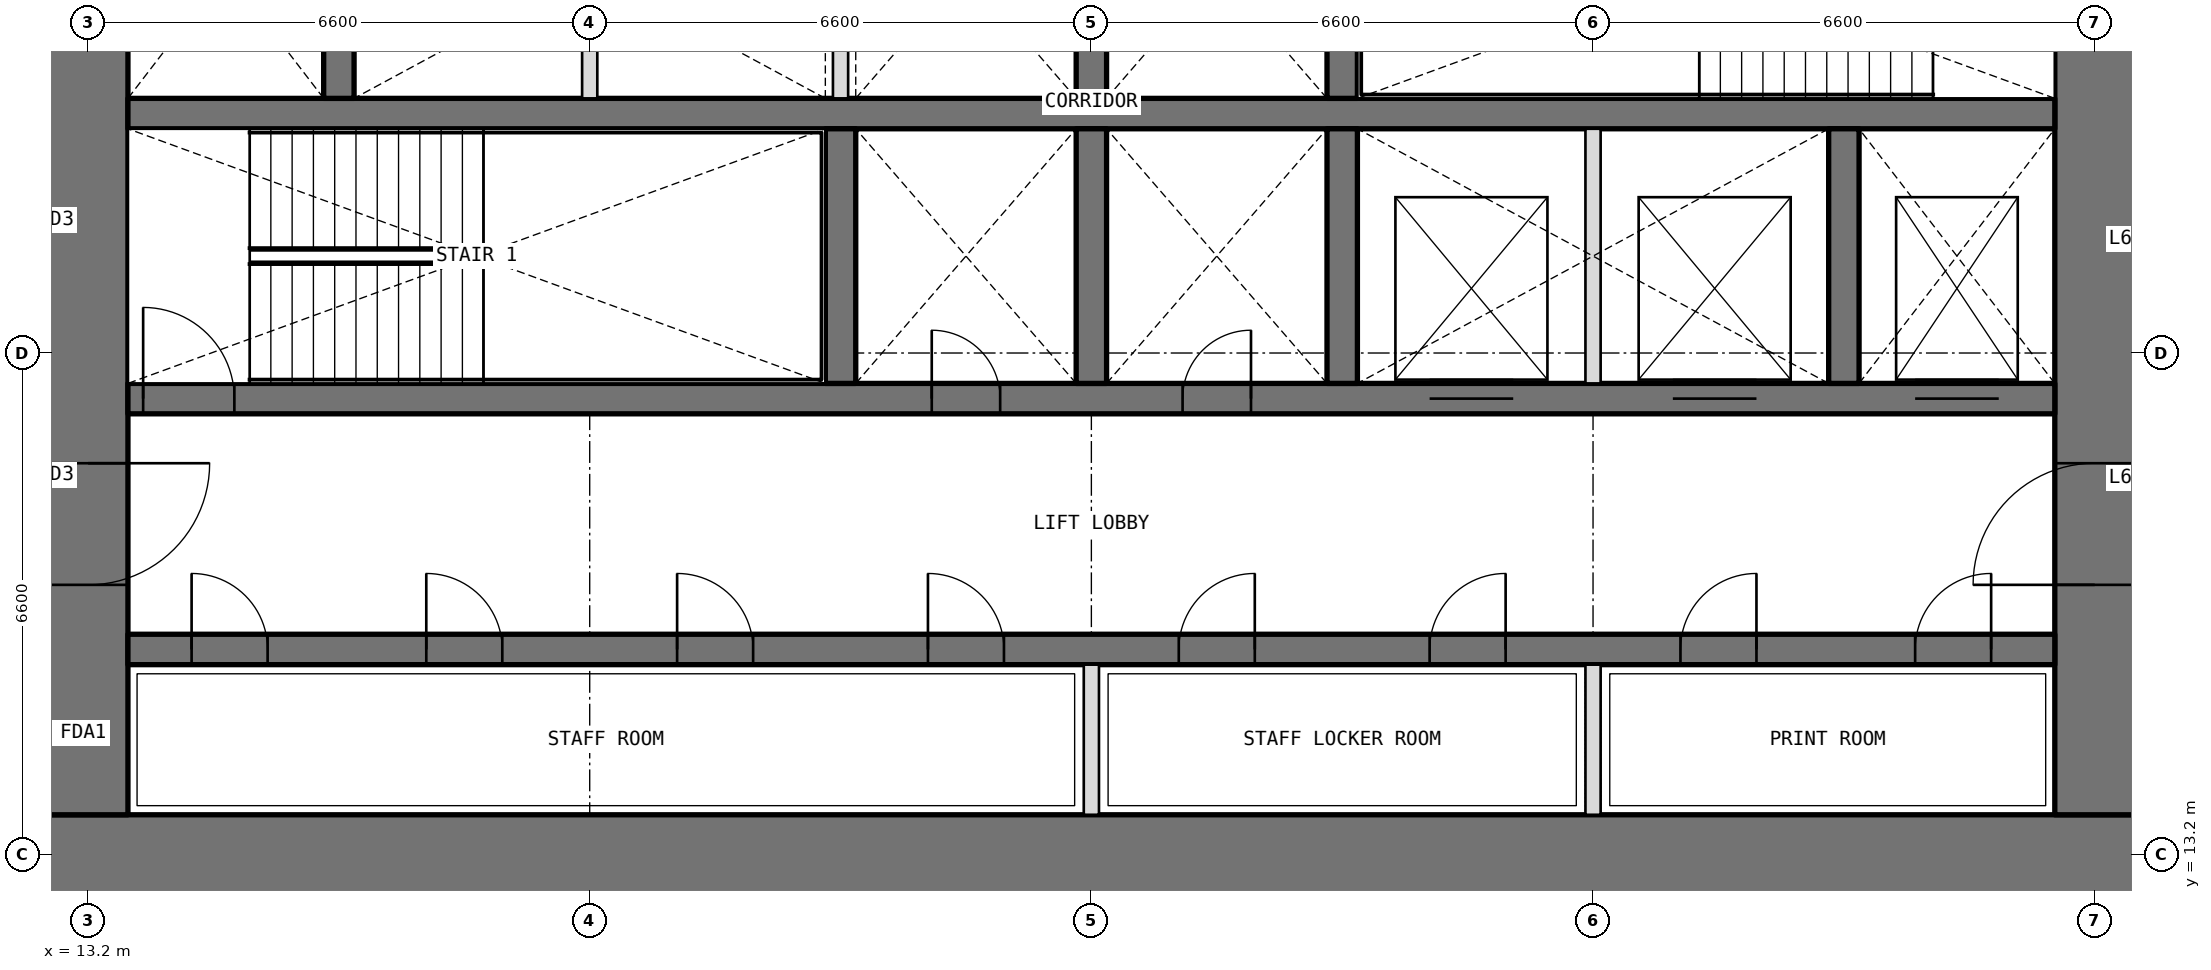
"""IFC4 building model, lengths in metres.
Left out: names, types, materials, properties, quantities, classifications, styles, units other than length and angle.
Written with IfcOpenShell. Run it as: python <this file> out.ifc"""

import sys

from ifc_helpers import new_model, si_unit, direction, frame, frame_2d, origin, place, context, subcontext, project, spatial, rectangle, extrude, element, fill, save


model = new_model("IFC4")
c1 = context("Model", 3, precision=1e-05, world=origin(), true_north=direction((0.0, 1.0)))
c2 = subcontext(c1, "Body", "Model", "MODEL_VIEW")
j1 = project(units=[si_unit("LENGTHUNIT", "METRE"), si_unit("PLANEANGLEUNIT", "RADIAN")], contexts=[c1])
p1 = place(None, origin())
s1 = spatial("IfcSite", under=j1, at=p1, CompositionType="ELEMENT")
p2 = place(p1, origin())
s2 = spatial("IfcBuilding", under=s1, at=p2, CompositionType="ELEMENT")
p3 = place(p2, frame((0.0, 0.0, 279.6)))
s3 = spatial("IfcBuildingStorey", under=s2, at=p3, CompositionType="ELEMENT", Elevation=279.6)
p4 = place(p3, frame((12.675, 13.2, 0.0), z_axis=(0.0, 0.0, 1.0), x_axis=(1.0, 0.0, 0.0)))
e1 = element("IfcWall", 1, at=p4, inside=s3, PredefinedType="SHEAR", context=c2, shape_type="SweptSolid", body=[
    extrude(rectangle(XDim=27.45, YDim=1.05, at=frame_2d((13.725, 0.0))), origin(), (0.0, 0.0, 1.0), 4.2),
])
p5 = place(p3, frame((39.6, 13.725, 0.0), z_axis=(0.0, 0.0, 1.0), x_axis=(0.0, 1.0, 0.0)))
e2 = element("IfcWall", 2, at=p5, inside=s3, PredefinedType="SHEAR", context=c2, shape_type="SweptSolid", body=[
    extrude(rectangle(XDim=18.75, YDim=1.05, at=frame_2d((9.375, 0.0))), origin(), (0.0, 0.0, 1.0), 4.2),
])
p6 = place(p5, frame((3.025, 0.0, 0.0)))
e3 = element("IfcOpeningElement", 3, at=p6, cuts=e2, PredefinedType="OPENING", context=c2, shape_type="SweptSolid", body=[
    extrude(rectangle(XDim=1.6, YDim=2.1, at=frame_2d((0.8, 1.05))), frame((0.0, 0.535, 0.0), z_axis=(0.0, -1.0, 0.0), x_axis=(1.0, 0.0, 0.0)), (0.0, 0.0, 1.0), 1.07),
])
p7 = place(p5, frame((13.825, 0.0, 0.0)))
e4 = element("IfcOpeningElement", 4, at=p7, cuts=e2, PredefinedType="OPENING", context=c2, shape_type="SweptSolid", body=[
    extrude(rectangle(XDim=1.6, YDim=2.1, at=frame_2d((0.8, 1.05))), frame((0.0, 0.535, 0.0), z_axis=(0.0, -1.0, 0.0), x_axis=(1.0, 0.0, 0.0)), (0.0, 0.0, 1.0), 1.07),
])
p8 = place(p3, frame((13.2, 32.475, 0.0), z_axis=(0.0, 0.0, 1.0), x_axis=(0.0, -1.0, 0.0)))
e5 = element("IfcWall", 5, at=p8, inside=s3, PredefinedType="SHEAR", context=c2, shape_type="SweptSolid", body=[
    extrude(rectangle(XDim=18.75, YDim=1.05, at=frame_2d((9.375, 0.0))), origin(), (0.0, 0.0, 1.0), 4.2),
])
p9 = place(p8, frame((14.125, 0.0, 0.0)))
e6 = element("IfcOpeningElement", 6, at=p9, cuts=e5, PredefinedType="OPENING", context=c2, shape_type="SweptSolid", body=[
    extrude(rectangle(XDim=1.6, YDim=2.1, at=frame_2d((0.8, 1.05))), frame((0.0, 0.535, 0.0), z_axis=(0.0, -1.0, 0.0), x_axis=(1.0, 0.0, 0.0)), (0.0, 0.0, 1.0), 1.07),
])
p10 = place(p8, frame((3.325, 0.0, 0.0)))
e7 = element("IfcOpeningElement", 7, at=p10, cuts=e5, PredefinedType="OPENING", context=c2, shape_type="SweptSolid", body=[
    extrude(rectangle(XDim=1.6, YDim=2.1, at=frame_2d((0.8, 1.05))), frame((0.0, 0.535, 0.0), z_axis=(0.0, -1.0, 0.0), x_axis=(1.0, 0.0, 0.0)), (0.0, 0.0, 1.0), 1.07),
])
p11 = place(p3, frame((13.725, 15.9, 0.0), z_axis=(0.0, 0.0, 1.0), x_axis=(1.0, 0.0, 0.0)))
e8 = element("IfcWall", 8, at=p11, inside=s3, PredefinedType="SHEAR", context=c2, shape_type="SweptSolid", body=[
    extrude(rectangle(XDim=25.35, YDim=0.4, at=frame_2d((12.675, 0.0))), origin(), (0.0, 0.0, 1.0), 4.2),
])
p12 = place(p11, frame((0.837, 0.0, 0.0)))
e9 = element("IfcOpeningElement", 9, at=p12, cuts=e8, PredefinedType="OPENING", context=c2, shape_type="SweptSolid", body=[
    extrude(rectangle(XDim=1.0, YDim=2.1, at=frame_2d((0.5, 1.05))), frame((0.0, 0.21, 0.0), z_axis=(0.0, -1.0, 0.0), x_axis=(1.0, 0.0, 0.0)), (0.0, 0.0, 1.0), 0.42),
])
p13 = place(p11, frame((3.925, 0.0, 0.0)))
e10 = element("IfcOpeningElement", 10, at=p13, cuts=e8, PredefinedType="OPENING", context=c2, shape_type="SweptSolid", body=[
    extrude(rectangle(XDim=1.0, YDim=2.1, at=frame_2d((0.5, 1.05))), frame((0.0, 0.21, 0.0), z_axis=(0.0, -1.0, 0.0), x_axis=(1.0, 0.0, 0.0)), (0.0, 0.0, 1.0), 0.42),
])
p14 = place(p11, frame((7.225, 0.0, 0.0)))
e11 = element("IfcOpeningElement", 11, at=p14, cuts=e8, PredefinedType="OPENING", context=c2, shape_type="SweptSolid", body=[
    extrude(rectangle(XDim=1.0, YDim=2.1, at=frame_2d((0.5, 1.05))), frame((0.0, 0.21, 0.0), z_axis=(0.0, -1.0, 0.0), x_axis=(1.0, 0.0, 0.0)), (0.0, 0.0, 1.0), 0.42),
])
p15 = place(p11, frame((10.525, 0.0, 0.0)))
e12 = element("IfcOpeningElement", 12, at=p15, cuts=e8, PredefinedType="OPENING", context=c2, shape_type="SweptSolid", body=[
    extrude(rectangle(XDim=1.0, YDim=2.1, at=frame_2d((0.5, 1.05))), frame((0.0, 0.21, 0.0), z_axis=(0.0, -1.0, 0.0), x_axis=(1.0, 0.0, 0.0)), (0.0, 0.0, 1.0), 0.42),
])
p16 = place(p11, frame((13.825, 0.0, 0.0)))
e13 = element("IfcOpeningElement", 13, at=p16, cuts=e8, PredefinedType="OPENING", context=c2, shape_type="SweptSolid", body=[
    extrude(rectangle(XDim=1.0, YDim=2.1, at=frame_2d((0.5, 1.05))), frame((0.0, 0.21, 0.0), z_axis=(0.0, -1.0, 0.0), x_axis=(1.0, 0.0, 0.0)), (0.0, 0.0, 1.0), 0.42),
])
p17 = place(p11, frame((17.125, 0.0, 0.0)))
e14 = element("IfcOpeningElement", 14, at=p17, cuts=e8, PredefinedType="OPENING", context=c2, shape_type="SweptSolid", body=[
    extrude(rectangle(XDim=1.0, YDim=2.1, at=frame_2d((0.5, 1.05))), frame((0.0, 0.21, 0.0), z_axis=(0.0, -1.0, 0.0), x_axis=(1.0, 0.0, 0.0)), (0.0, 0.0, 1.0), 0.42),
])
p18 = place(p11, frame((20.425, 0.0, 0.0)))
e15 = element("IfcOpeningElement", 15, at=p18, cuts=e8, PredefinedType="OPENING", context=c2, shape_type="SweptSolid", body=[
    extrude(rectangle(XDim=1.0, YDim=2.1, at=frame_2d((0.5, 1.05))), frame((0.0, 0.21, 0.0), z_axis=(0.0, -1.0, 0.0), x_axis=(1.0, 0.0, 0.0)), (0.0, 0.0, 1.0), 0.42),
])
p19 = place(p11, frame((23.512, 0.0, 0.0)))
e16 = element("IfcOpeningElement", 16, at=p19, cuts=e8, PredefinedType="OPENING", context=c2, shape_type="SweptSolid", body=[
    extrude(rectangle(XDim=1.0, YDim=2.1, at=frame_2d((0.5, 1.05))), frame((0.0, 0.21, 0.0), z_axis=(0.0, -1.0, 0.0), x_axis=(1.0, 0.0, 0.0)), (0.0, 0.0, 1.0), 0.42),
])
p20 = place(p3, frame((13.725, 19.2, 0.0), z_axis=(0.0, 0.0, 1.0), x_axis=(1.0, 0.0, 0.0)))
e17 = element("IfcWall", 17, at=p20, inside=s3, PredefinedType="SHEAR", context=c2, shape_type="SweptSolid", body=[
    extrude(rectangle(XDim=25.35, YDim=0.4, at=frame_2d((12.675, 0.0))), origin(), (0.0, 0.0, 1.0), 4.2),
])
p21 = place(p20, frame((10.575, 0.0, 0.0)))
e18 = element("IfcOpeningElement", 18, at=p21, cuts=e17, PredefinedType="OPENING", context=c2, shape_type="SweptSolid", body=[
    extrude(rectangle(XDim=0.9, YDim=2.1, at=frame_2d((0.45, 1.05))), frame((0.0, 0.21, 0.0), z_axis=(0.0, -1.0, 0.0), x_axis=(1.0, 0.0, 0.0)), (0.0, 0.0, 1.0), 0.42),
])
p22 = place(p20, frame((13.875, 0.0, 0.0)))
e19 = element("IfcOpeningElement", 19, at=p22, cuts=e17, PredefinedType="OPENING", context=c2, shape_type="SweptSolid", body=[
    extrude(rectangle(XDim=0.9, YDim=2.1, at=frame_2d((0.45, 1.05))), frame((0.0, 0.21, 0.0), z_axis=(0.0, -1.0, 0.0), x_axis=(1.0, 0.0, 0.0)), (0.0, 0.0, 1.0), 0.42),
])
p23 = place(p20, frame((0.2, 0.0, 0.0)))
e20 = element("IfcOpeningElement", 20, at=p23, cuts=e17, PredefinedType="OPENING", context=c2, shape_type="SweptSolid", body=[
    extrude(rectangle(XDim=1.2, YDim=2.1, at=frame_2d((0.6, 1.05))), frame((0.0, 0.21, 0.0), z_axis=(0.0, -1.0, 0.0), x_axis=(1.0, 0.0, 0.0)), (0.0, 0.0, 1.0), 0.42),
])
p24 = place(p20, frame((23.512, 0.0, 0.0)))
e21 = element("IfcOpeningElement", 21, at=p24, cuts=e17, PredefinedType="OPENING", context=c2, shape_type="SweptSolid", body=[
    extrude(rectangle(XDim=1.1, YDim=2.1, at=frame_2d((0.55, 1.05))), frame((0.0, 0.21, 0.0), z_axis=(0.0, -1.0, 0.0), x_axis=(1.0, 0.0, 0.0)), (0.0, 0.0, 1.0), 0.42),
])
p25 = place(p20, frame((17.125, 0.0, 0.0)))
e22 = element("IfcOpeningElement", 22, at=p25, cuts=e17, PredefinedType="OPENING", context=c2, shape_type="SweptSolid", body=[
    extrude(rectangle(XDim=1.1, YDim=2.1, at=frame_2d((0.55, 1.05))), frame((0.0, 0.21, 0.0), z_axis=(0.0, -1.0, 0.0), x_axis=(1.0, 0.0, 0.0)), (0.0, 0.0, 1.0), 0.42),
])
p26 = place(p20, frame((20.325, 0.0, 0.0)))
e23 = element("IfcOpeningElement", 23, at=p26, cuts=e17, PredefinedType="OPENING", context=c2, shape_type="SweptSolid", body=[
    extrude(rectangle(XDim=1.1, YDim=2.1, at=frame_2d((0.55, 1.05))), frame((0.0, 0.21, 0.0), z_axis=(0.0, -1.0, 0.0), x_axis=(1.0, 0.0, 0.0)), (0.0, 0.0, 1.0), 0.42),
])
p27 = place(p3, frame((13.725, 22.95, 0.0), z_axis=(0.0, 0.0, 1.0), x_axis=(1.0, 0.0, 0.0)))
e24 = element("IfcWall", 24, at=p27, inside=s3, PredefinedType="SHEAR", context=c2, shape_type="SweptSolid", body=[
    extrude(rectangle(XDim=25.35, YDim=0.4, at=frame_2d((12.675, 0.0))), origin(), (0.0, 0.0, 1.0), 4.2),
])
for number, where, z_axis, x_axis in (
    (25, (23.1, 19.4, 0.0), (0.0, 0.0, 1.0), (0.0, 1.0, 0.0)),
    (26, (26.4, 19.4, 0.0), (0.0, 0.0, 1.0), (0.0, 1.0, 0.0)),
    (27, (29.7, 19.4, 0.0), (0.0, 0.0, 1.0), (0.0, 1.0, 0.0)),
    (28, (36.3, 19.4, 0.0), (0.0, 0.0, 1.0), (0.0, 1.0, 0.0)),
    (29, (16.5, 23.15, 0.0), (0.0, 0.0, 1.0), (0.0, 1.0, 0.0)),
    (30, (26.4, 23.15, 0.0), (0.0, 0.0, 1.0), (0.0, 1.0, 0.0)),
    (31, (29.7, 23.15, 0.0), (0.0, 0.0, 1.0), (0.0, 1.0, 0.0)),
):
    element("IfcWall", number, at=place(p3, frame(where, z_axis=z_axis, x_axis=x_axis)), inside=s3, PredefinedType="SHEAR", context=c2, shape_type="SweptSolid", body=[
        extrude(rectangle(XDim=3.35, YDim=0.4, at=frame_2d((1.675, 0.0))), origin(), (0.0, 0.0, 1.0), 4.2),
    ])
for number, where, z_axis, x_axis in (
    (32, (26.4, 13.725, 0.0), (0.0, 0.0, 1.0), (0.0, 1.0, 0.0)),
    (33, (33.0, 13.725, 0.0), (0.0, 0.0, 1.0), (0.0, 1.0, 0.0)),
):
    element("IfcWall", number, at=place(p3, frame(where, z_axis=z_axis, x_axis=x_axis)), inside=s3, PredefinedType="PARTITIONING", context=c2, shape_type="SweptSolid", body=[
        extrude(rectangle(XDim=1.975, YDim=0.2, at=frame_2d((0.987, 0.0))), origin(), (0.0, 0.0, 1.0), 4.2),
    ])
for number, where, z_axis, x_axis in (
    (34, (33.0, 19.4, 0.0), (0.0, 0.0, 1.0), (0.0, 1.0, 0.0)),
    (35, (19.8, 23.15, 0.0), (0.0, 0.0, 1.0), (0.0, 1.0, 0.0)),
    (36, (23.1, 23.15, 0.0), (0.0, 0.0, 1.0), (0.0, 1.0, 0.0)),
):
    element("IfcWall", number, at=place(p3, frame(where, z_axis=z_axis, x_axis=x_axis)), inside=s3, PredefinedType="PARTITIONING", context=c2, shape_type="SweptSolid", body=[
        extrude(rectangle(XDim=3.35, YDim=0.2, at=frame_2d((1.675, 0.0))), origin(), (0.0, 0.0, 1.0), 4.2),
    ])
p28 = place(p21, origin())
e37 = element("IfcDoor", 37, at=p28, inside=s3, OperationType="SINGLE_SWING_LEFT", PredefinedType="DOOR", context=c2, shape_type="SweptSolid", body=[
    extrude(rectangle(XDim=0.9, YDim=2.1, at=frame_2d((0.45, 1.05))), frame((0.0, 0.025, 0.0), z_axis=(0.0, -1.0, 0.0), x_axis=(1.0, 0.0, 0.0)), (0.0, 0.0, 1.0), 0.05),
])
fill(e18, e37)
p29 = place(p22, origin())
e38 = element("IfcDoor", 38, at=p29, inside=s3, OperationType="SINGLE_SWING_RIGHT", PredefinedType="DOOR", context=c2, shape_type="SweptSolid", body=[
    extrude(rectangle(XDim=0.9, YDim=2.1, at=frame_2d((0.45, 1.05))), frame((0.0, 0.025, 0.0), z_axis=(0.0, -1.0, 0.0), x_axis=(1.0, 0.0, 0.0)), (0.0, 0.0, 1.0), 0.05),
])
fill(e19, e38)
p30 = place(p12, origin())
e39 = element("IfcDoor", 39, at=p30, inside=s3, OperationType="SINGLE_SWING_LEFT", PredefinedType="DOOR", context=c2, shape_type="SweptSolid", body=[
    extrude(rectangle(XDim=1.0, YDim=2.1, at=frame_2d((0.5, 1.05))), frame((0.0, 0.025, 0.0), z_axis=(0.0, -1.0, 0.0), x_axis=(1.0, 0.0, 0.0)), (0.0, 0.0, 1.0), 0.05),
])
fill(e9, e39)
p31 = place(p13, origin())
e40 = element("IfcDoor", 40, at=p31, inside=s3, OperationType="SINGLE_SWING_LEFT", PredefinedType="DOOR", context=c2, shape_type="SweptSolid", body=[
    extrude(rectangle(XDim=1.0, YDim=2.1, at=frame_2d((0.5, 1.05))), frame((0.0, 0.025, 0.0), z_axis=(0.0, -1.0, 0.0), x_axis=(1.0, 0.0, 0.0)), (0.0, 0.0, 1.0), 0.05),
])
fill(e10, e40)
p32 = place(p14, origin())
e41 = element("IfcDoor", 41, at=p32, inside=s3, OperationType="SINGLE_SWING_LEFT", PredefinedType="DOOR", context=c2, shape_type="SweptSolid", body=[
    extrude(rectangle(XDim=1.0, YDim=2.1, at=frame_2d((0.5, 1.05))), frame((0.0, 0.025, 0.0), z_axis=(0.0, -1.0, 0.0), x_axis=(1.0, 0.0, 0.0)), (0.0, 0.0, 1.0), 0.05),
])
fill(e11, e41)
p33 = place(p15, origin())
e42 = element("IfcDoor", 42, at=p33, inside=s3, OperationType="SINGLE_SWING_LEFT", PredefinedType="DOOR", context=c2, shape_type="SweptSolid", body=[
    extrude(rectangle(XDim=1.0, YDim=2.1, at=frame_2d((0.5, 1.05))), frame((0.0, 0.025, 0.0), z_axis=(0.0, -1.0, 0.0), x_axis=(1.0, 0.0, 0.0)), (0.0, 0.0, 1.0), 0.05),
])
fill(e12, e42)
p34 = place(p16, origin())
e43 = element("IfcDoor", 43, at=p34, inside=s3, OperationType="SINGLE_SWING_RIGHT", PredefinedType="DOOR", context=c2, shape_type="SweptSolid", body=[
    extrude(rectangle(XDim=1.0, YDim=2.1, at=frame_2d((0.5, 1.05))), frame((0.0, 0.025, 0.0), z_axis=(0.0, -1.0, 0.0), x_axis=(1.0, 0.0, 0.0)), (0.0, 0.0, 1.0), 0.05),
])
fill(e13, e43)
p35 = place(p17, origin())
e44 = element("IfcDoor", 44, at=p35, inside=s3, OperationType="SINGLE_SWING_RIGHT", PredefinedType="DOOR", context=c2, shape_type="SweptSolid", body=[
    extrude(rectangle(XDim=1.0, YDim=2.1, at=frame_2d((0.5, 1.05))), frame((0.0, 0.025, 0.0), z_axis=(0.0, -1.0, 0.0), x_axis=(1.0, 0.0, 0.0)), (0.0, 0.0, 1.0), 0.05),
])
fill(e14, e44)
p36 = place(p18, origin())
e45 = element("IfcDoor", 45, at=p36, inside=s3, OperationType="SINGLE_SWING_RIGHT", PredefinedType="DOOR", context=c2, shape_type="SweptSolid", body=[
    extrude(rectangle(XDim=1.0, YDim=2.1, at=frame_2d((0.5, 1.05))), frame((0.0, 0.025, 0.0), z_axis=(0.0, -1.0, 0.0), x_axis=(1.0, 0.0, 0.0)), (0.0, 0.0, 1.0), 0.05),
])
fill(e15, e45)
p37 = place(p19, origin())
e46 = element("IfcDoor", 46, at=p37, inside=s3, OperationType="SINGLE_SWING_RIGHT", PredefinedType="DOOR", context=c2, shape_type="SweptSolid", body=[
    extrude(rectangle(XDim=1.0, YDim=2.1, at=frame_2d((0.5, 1.05))), frame((0.0, 0.025, 0.0), z_axis=(0.0, -1.0, 0.0), x_axis=(1.0, 0.0, 0.0)), (0.0, 0.0, 1.0), 0.05),
])
fill(e16, e46)
p38 = place(p23, origin())
e47 = element("IfcDoor", 47, at=p38, inside=s3, OperationType="SINGLE_SWING_LEFT", PredefinedType="DOOR", context=c2, shape_type="SweptSolid", body=[
    extrude(rectangle(XDim=1.2, YDim=2.1, at=frame_2d((0.6, 1.05))), frame((0.0, 0.025, 0.0), z_axis=(0.0, -1.0, 0.0), x_axis=(1.0, 0.0, 0.0)), (0.0, 0.0, 1.0), 0.05),
])
fill(e20, e47)
p39 = place(p9, origin())
e48 = element("IfcDoor", 48, at=p39, inside=s3, OperationType="DOUBLE_DOOR_DOUBLE_SWING", PredefinedType="DOOR", context=c2, shape_type="SweptSolid", body=[
    extrude(rectangle(XDim=1.6, YDim=2.1, at=frame_2d((0.8, 1.05))), frame((0.0, 0.025, 0.0), z_axis=(0.0, -1.0, 0.0), x_axis=(1.0, 0.0, 0.0)), (0.0, 0.0, 1.0), 0.05),
])
fill(e6, e48)
p40 = place(p6, origin())
e49 = element("IfcDoor", 49, at=p40, inside=s3, OperationType="DOUBLE_DOOR_DOUBLE_SWING", PredefinedType="DOOR", context=c2, shape_type="SweptSolid", body=[
    extrude(rectangle(XDim=1.6, YDim=2.1, at=frame_2d((0.8, 1.05))), frame((0.0, 0.025, 0.0), z_axis=(0.0, -1.0, 0.0), x_axis=(1.0, 0.0, 0.0)), (0.0, 0.0, 1.0), 0.05),
])
fill(e3, e49)
p41 = place(p24, origin())
e50 = element("IfcDoor", 50, at=p41, inside=s3, OperationType="DOUBLE_DOOR_SLIDING", PredefinedType="DOOR", context=c2, shape_type="SweptSolid", body=[
    extrude(rectangle(XDim=1.1, YDim=2.1, at=frame_2d((0.55, 1.05))), frame((0.0, 0.025, 0.0), z_axis=(0.0, -1.0, 0.0), x_axis=(1.0, 0.0, 0.0)), (0.0, 0.0, 1.0), 0.05),
])
fill(e21, e50)
p42 = place(p25, origin())
e51 = element("IfcDoor", 51, at=p42, inside=s3, OperationType="DOUBLE_DOOR_SLIDING", PredefinedType="DOOR", context=c2, shape_type="SweptSolid", body=[
    extrude(rectangle(XDim=1.1, YDim=2.1, at=frame_2d((0.55, 1.05))), frame((0.0, 0.025, 0.0), z_axis=(0.0, -1.0, 0.0), x_axis=(1.0, 0.0, 0.0)), (0.0, 0.0, 1.0), 0.05),
])
fill(e22, e51)
p43 = place(p26, origin())
e52 = element("IfcDoor", 52, at=p43, inside=s3, OperationType="DOUBLE_DOOR_SLIDING", PredefinedType="DOOR", context=c2, shape_type="SweptSolid", body=[
    extrude(rectangle(XDim=1.1, YDim=2.1, at=frame_2d((0.55, 1.05))), frame((0.0, 0.025, 0.0), z_axis=(0.0, -1.0, 0.0), x_axis=(1.0, 0.0, 0.0)), (0.0, 0.0, 1.0), 0.05),
])
fill(e23, e52)
save(model, sys.argv[1])
